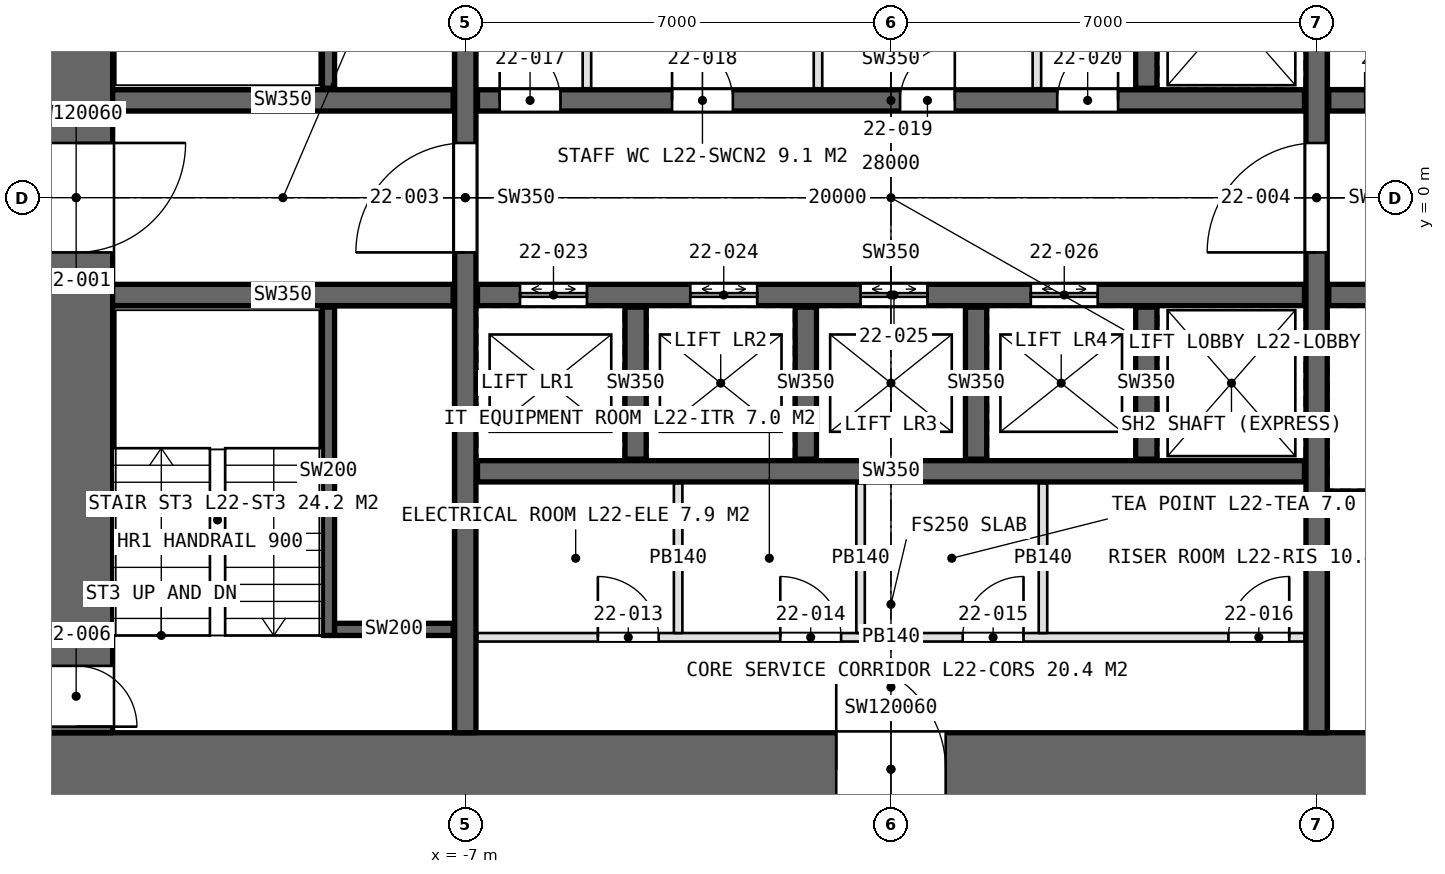
"""IFC4 building model, lengths in metres.
Left out: names, types, materials, properties, quantities, classifications, styles, units other than length and angle.
Written with IfcOpenShell. Run it as: python <this file> out.ifc"""

import sys

from ifc_helpers import new_model, si_unit, direction, frame, frame_2d, origin, place, context, subcontext, project, spatial, rectangle, extrude, element, fill, save


model = new_model("IFC4")
c1 = context("Model", 3, precision=1e-05, world=origin(), true_north=direction((0.0, 1.0)))
c2 = subcontext(c1, "Body", "Model", "MODEL_VIEW")
j1 = project(units=[si_unit("LENGTHUNIT", "METRE"), si_unit("PLANEANGLEUNIT", "RADIAN")], contexts=[c1])
p1 = place(None, origin())
s1 = spatial("IfcSite", under=j1, at=p1, CompositionType="ELEMENT")
p2 = place(p1, origin())
s2 = spatial("IfcBuilding", under=s1, at=p2, CompositionType="ELEMENT")
p3 = place(p2, frame((0.0, 0.0, 109.2)))
s3 = spatial("IfcBuildingStorey", under=s2, at=p3, CompositionType="ELEMENT", Elevation=109.2)
p4 = place(p3, frame((-14.0, -9.4, 0.0), z_axis=(0.0, 0.0, 1.0), x_axis=(1.0, 0.0, 0.0)))
e1 = element("IfcWall", 1, at=p4, inside=s3, PredefinedType="SHEAR", context=c2, shape_type="SweptSolid", body=[
    extrude(rectangle(XDim=28.0, YDim=1.2, at=frame_2d((14.0, 0.0))), origin(), (0.0, 0.0, 1.0), 4.2),
])
p5 = place(p4, frame((13.1, 0.0, 0.0)))
e2 = element("IfcOpeningElement", 2, at=p5, cuts=e1, PredefinedType="OPENING", context=c2, shape_type="SweptSolid", body=[
    extrude(rectangle(XDim=1.8, YDim=2.4, at=frame_2d((0.9, 1.2))), frame((0.0, 0.61, 0.0), z_axis=(0.0, -1.0, 0.0), x_axis=(1.0, 0.0, 0.0)), (0.0, 0.0, 1.0), 1.22),
])
p6 = place(p4, frame((22.9, 0.0, 0.0)))
e3 = element("IfcOpeningElement", 3, at=p6, cuts=e1, PredefinedType="OPENING", context=c2, shape_type="SweptSolid", body=[
    extrude(rectangle(XDim=2.2, YDim=2.7, at=frame_2d((1.1, 1.35))), frame((0.0, 0.61, 0.0), z_axis=(0.0, -1.0, 0.0), x_axis=(1.0, 0.0, 0.0)), (0.0, 0.0, 1.0), 1.22),
])
p7 = place(p3, frame((-13.4, 8.8, 0.0), z_axis=(0.0, 0.0, 1.0), x_axis=(0.0, -1.0, 0.0)))
e4 = element("IfcWall", 4, at=p7, inside=s3, PredefinedType="SHEAR", context=c2, shape_type="SweptSolid", body=[
    extrude(rectangle(XDim=17.6, YDim=1.2, at=frame_2d((8.8, 0.0))), origin(), (0.0, 0.0, 1.0), 4.2),
])
p8 = place(p7, frame((7.9, 0.0, 0.0)))
e5 = element("IfcOpeningElement", 5, at=p8, cuts=e4, PredefinedType="OPENING", context=c2, shape_type="SweptSolid", body=[
    extrude(rectangle(XDim=1.8, YDim=2.4, at=frame_2d((0.9, 1.2))), frame((0.0, 0.61, 0.0), z_axis=(0.0, -1.0, 0.0), x_axis=(1.0, 0.0, 0.0)), (0.0, 0.0, 1.0), 1.22),
])
p9 = place(p7, frame((16.5, 0.0, 0.0)))
e6 = element("IfcOpeningElement", 6, at=p9, cuts=e4, PredefinedType="OPENING", context=c2, shape_type="SweptSolid", body=[
    extrude(rectangle(XDim=1.0, YDim=2.4, at=frame_2d((0.5, 1.2))), frame((0.0, 0.61, 0.0), z_axis=(0.0, -1.0, 0.0), x_axis=(1.0, 0.0, 0.0)), (0.0, 0.0, 1.0), 1.22),
])
p10 = place(p3, frame((-7.0, -8.8, 0.0), z_axis=(0.0, 0.0, 1.0), x_axis=(0.0, 1.0, 0.0)))
e7 = element("IfcWall", 7, at=p10, inside=s3, PredefinedType="SHEAR", context=c2, shape_type="SweptSolid", body=[
    extrude(rectangle(XDim=17.6, YDim=0.35, at=frame_2d((8.8, 0.0))), origin(), (0.0, 0.0, 1.0), 4.2),
])
p11 = place(p10, frame((7.9, 0.0, 0.0)))
e8 = element("IfcOpeningElement", 8, at=p11, cuts=e7, PredefinedType="OPENING", context=c2, shape_type="SweptSolid", body=[
    extrude(rectangle(XDim=1.8, YDim=2.4, at=frame_2d((0.9, 1.2))), frame((0.0, 0.185, 0.0), z_axis=(0.0, -1.0, 0.0), x_axis=(1.0, 0.0, 0.0)), (0.0, 0.0, 1.0), 0.37),
])
p12 = place(p3, frame((7.0, -8.8, 0.0), z_axis=(0.0, 0.0, 1.0), x_axis=(0.0, 1.0, 0.0)))
e9 = element("IfcWall", 9, at=p12, inside=s3, PredefinedType="SHEAR", context=c2, shape_type="SweptSolid", body=[
    extrude(rectangle(XDim=17.6, YDim=0.35, at=frame_2d((8.8, 0.0))), origin(), (0.0, 0.0, 1.0), 4.2),
])
p13 = place(p12, frame((7.9, 0.0, 0.0)))
e10 = element("IfcOpeningElement", 10, at=p13, cuts=e9, PredefinedType="OPENING", context=c2, shape_type="SweptSolid", body=[
    extrude(rectangle(XDim=1.8, YDim=2.4, at=frame_2d((0.9, 1.2))), frame((0.0, 0.185, 0.0), z_axis=(0.0, -1.0, 0.0), x_axis=(1.0, 0.0, 0.0)), (0.0, 0.0, 1.0), 0.37),
])
p14 = place(p3, frame((-6.8, 1.6, 0.0), z_axis=(0.0, 0.0, 1.0), x_axis=(1.0, 0.0, 0.0)))
e11 = element("IfcWall", 11, at=p14, inside=s3, PredefinedType="SHEAR", context=c2, shape_type="SweptSolid", body=[
    extrude(rectangle(XDim=13.6, YDim=0.35, at=frame_2d((6.8, 0.0))), origin(), (0.0, 0.0, 1.0), 4.2),
])
p15 = place(p14, frame((0.365, 0.0, 0.0)))
e12 = element("IfcOpeningElement", 12, at=p15, cuts=e11, PredefinedType="OPENING", context=c2, shape_type="SweptSolid", body=[
    extrude(rectangle(XDim=1.0, YDim=2.4, at=frame_2d((0.5, 1.2))), frame((0.0, 0.185, 0.0), z_axis=(0.0, -1.0, 0.0), x_axis=(1.0, 0.0, 0.0)), (0.0, 0.0, 1.0), 0.37),
])
p16 = place(p14, frame((3.2, 0.0, 0.0)))
e13 = element("IfcOpeningElement", 13, at=p16, cuts=e11, PredefinedType="OPENING", context=c2, shape_type="SweptSolid", body=[
    extrude(rectangle(XDim=1.0, YDim=2.4, at=frame_2d((0.5, 1.2))), frame((0.0, 0.185, 0.0), z_axis=(0.0, -1.0, 0.0), x_axis=(1.0, 0.0, 0.0)), (0.0, 0.0, 1.0), 0.37),
])
p17 = place(p14, frame((6.95, 0.0, 0.0)))
e14 = element("IfcOpeningElement", 14, at=p17, cuts=e11, PredefinedType="OPENING", context=c2, shape_type="SweptSolid", body=[
    extrude(rectangle(XDim=0.9, YDim=2.4, at=frame_2d((0.45, 1.2))), frame((0.0, 0.185, 0.0), z_axis=(0.0, -1.0, 0.0), x_axis=(1.0, 0.0, 0.0)), (0.0, 0.0, 1.0), 0.37),
])
p18 = place(p14, frame((9.535, 0.0, 0.0)))
e15 = element("IfcOpeningElement", 15, at=p18, cuts=e11, PredefinedType="OPENING", context=c2, shape_type="SweptSolid", body=[
    extrude(rectangle(XDim=1.0, YDim=2.4, at=frame_2d((0.5, 1.2))), frame((0.0, 0.185, 0.0), z_axis=(0.0, -1.0, 0.0), x_axis=(1.0, 0.0, 0.0)), (0.0, 0.0, 1.0), 0.37),
])
p19 = place(p3, frame((-6.8, -1.6, 0.0), z_axis=(0.0, 0.0, 1.0), x_axis=(1.0, 0.0, 0.0)))
e16 = element("IfcWall", 16, at=p19, inside=s3, PredefinedType="SHEAR", context=c2, shape_type="SweptSolid", body=[
    extrude(rectangle(XDim=13.6, YDim=0.35, at=frame_2d((6.8, 0.0))), origin(), (0.0, 0.0, 1.0), 4.2),
])
p20 = place(p19, frame((0.7, 0.0, 0.0)))
e17 = element("IfcOpeningElement", 17, at=p20, cuts=e16, PredefinedType="OPENING", context=c2, shape_type="SweptSolid", body=[
    extrude(rectangle(XDim=1.1, YDim=2.4, at=frame_2d((0.55, 1.2))), frame((0.0, 0.185, 0.0), z_axis=(0.0, -1.0, 0.0), x_axis=(1.0, 0.0, 0.0)), (0.0, 0.0, 1.0), 0.37),
])
p21 = place(p19, frame((3.5, 0.0, 0.0)))
e18 = element("IfcOpeningElement", 18, at=p21, cuts=e16, PredefinedType="OPENING", context=c2, shape_type="SweptSolid", body=[
    extrude(rectangle(XDim=1.1, YDim=2.4, at=frame_2d((0.55, 1.2))), frame((0.0, 0.185, 0.0), z_axis=(0.0, -1.0, 0.0), x_axis=(1.0, 0.0, 0.0)), (0.0, 0.0, 1.0), 0.37),
])
p22 = place(p19, frame((6.3, 0.0, 0.0)))
e19 = element("IfcOpeningElement", 19, at=p22, cuts=e16, PredefinedType="OPENING", context=c2, shape_type="SweptSolid", body=[
    extrude(rectangle(XDim=1.1, YDim=2.4, at=frame_2d((0.55, 1.2))), frame((0.0, 0.185, 0.0), z_axis=(0.0, -1.0, 0.0), x_axis=(1.0, 0.0, 0.0)), (0.0, 0.0, 1.0), 0.37),
])
p23 = place(p19, frame((9.1, 0.0, 0.0)))
e20 = element("IfcOpeningElement", 20, at=p23, cuts=e16, PredefinedType="OPENING", context=c2, shape_type="SweptSolid", body=[
    extrude(rectangle(XDim=1.1, YDim=2.4, at=frame_2d((0.55, 1.2))), frame((0.0, 0.185, 0.0), z_axis=(0.0, -1.0, 0.0), x_axis=(1.0, 0.0, 0.0)), (0.0, 0.0, 1.0), 0.37),
])
p24 = place(p3, frame((-6.8, -4.5, 0.0), z_axis=(0.0, 0.0, 1.0), x_axis=(1.0, 0.0, 0.0)))
e21 = element("IfcWall", 21, at=p24, inside=s3, PredefinedType="SHEAR", context=c2, shape_type="SweptSolid", body=[
    extrude(rectangle(XDim=13.6, YDim=0.35, at=frame_2d((6.8, 0.0))), origin(), (0.0, 0.0, 1.0), 4.2),
])
for number, where, z_axis, x_axis in (
    (22, (-12.8, 1.6, 0.0), (0.0, 0.0, 1.0), (1.0, 0.0, 0.0)),
    (23, (-12.8, -1.6, 0.0), (0.0, 0.0, 1.0), (1.0, 0.0, 0.0)),
):
    element("IfcWall", number, at=place(p3, frame(where, z_axis=z_axis, x_axis=x_axis)), inside=s3, PredefinedType="SHEAR", context=c2, shape_type="SweptSolid", body=[
        extrude(rectangle(XDim=5.6, YDim=0.35, at=frame_2d((2.8, 0.0))), origin(), (0.0, 0.0, 1.0), 4.2),
    ])
p25 = place(p3, frame((7.2, 1.6, 0.0), z_axis=(0.0, 0.0, 1.0), x_axis=(1.0, 0.0, 0.0)))
e24 = element("IfcWall", 24, at=p25, inside=s3, PredefinedType="SHEAR", context=c2, shape_type="SweptSolid", body=[
    extrude(rectangle(XDim=5.6, YDim=0.35, at=frame_2d((2.8, 0.0))), origin(), (0.0, 0.0, 1.0), 4.2),
])
p26 = place(p25, frame((0.6, 0.0, 0.0)))
e25 = element("IfcOpeningElement", 25, at=p26, cuts=e24, PredefinedType="OPENING", context=c2, shape_type="SweptSolid", body=[
    extrude(rectangle(XDim=1.0, YDim=2.4, at=frame_2d((0.5, 1.2))), frame((0.0, 0.185, 0.0), z_axis=(0.0, -1.0, 0.0), x_axis=(1.0, 0.0, 0.0)), (0.0, 0.0, 1.0), 0.37),
])
p27 = place(p3, frame((7.2, -1.6, 0.0), z_axis=(0.0, 0.0, 1.0), x_axis=(1.0, 0.0, 0.0)))
e26 = element("IfcWall", 26, at=p27, inside=s3, PredefinedType="SHEAR", context=c2, shape_type="SweptSolid", body=[
    extrude(rectangle(XDim=5.6, YDim=0.35, at=frame_2d((2.8, 0.0))), origin(), (0.0, 0.0, 1.0), 4.2),
])
p28 = place(p27, frame((0.9, 0.0, 0.0)))
e27 = element("IfcOpeningElement", 27, at=p28, cuts=e26, PredefinedType="OPENING", context=c2, shape_type="SweptSolid", body=[
    extrude(rectangle(XDim=1.3, YDim=2.4, at=frame_2d((0.65, 1.2))), frame((0.0, 0.185, 0.0), z_axis=(0.0, -1.0, 0.0), x_axis=(1.0, 0.0, 0.0)), (0.0, 0.0, 1.0), 0.37),
])
p29 = place(p27, frame((3.9, 0.0, 0.0)))
e28 = element("IfcOpeningElement", 28, at=p29, cuts=e26, PredefinedType="OPENING", context=c2, shape_type="SweptSolid", body=[
    extrude(rectangle(XDim=1.3, YDim=2.4, at=frame_2d((0.65, 1.2))), frame((0.0, 0.185, 0.0), z_axis=(0.0, -1.0, 0.0), x_axis=(1.0, 0.0, 0.0)), (0.0, 0.0, 1.0), 0.37),
])
p30 = place(p3, frame((7.2, -5.0, 0.0), z_axis=(0.0, 0.0, 1.0), x_axis=(1.0, 0.0, 0.0)))
e29 = element("IfcWall", 29, at=p30, inside=s3, PredefinedType="SHEAR", context=c2, shape_type="SweptSolid", body=[
    extrude(rectangle(XDim=5.6, YDim=0.35, at=frame_2d((2.8, 0.0))), origin(), (0.0, 0.0, 1.0), 4.2),
])
for number, where, z_axis, x_axis in (
    (30, (-4.2, -4.3, 0.0), (0.0, 0.0, 1.0), (0.0, 1.0, 0.0)),
    (31, (-1.4, -4.3, 0.0), (0.0, 0.0, 1.0), (0.0, 1.0, 0.0)),
    (32, (1.4, -4.3, 0.0), (0.0, 0.0, 1.0), (0.0, 1.0, 0.0)),
    (33, (4.2, 1.8, 0.0), (0.0, 0.0, 1.0), (0.0, 1.0, 0.0)),
    (34, (4.2, -4.3, 0.0), (0.0, 0.0, 1.0), (0.0, 1.0, 0.0)),
):
    element("IfcWall", number, at=place(p3, frame(where, z_axis=z_axis, x_axis=x_axis)), inside=s3, PredefinedType="SHEAR", context=c2, shape_type="SweptSolid", body=[
        extrude(rectangle(XDim=2.5, YDim=0.35, at=frame_2d((1.25, 0.0))), origin(), (0.0, 0.0, 1.0), 4.2),
    ])
p31 = place(p3, frame((-6.8, -7.23, 0.0), z_axis=(0.0, 0.0, 1.0), x_axis=(1.0, 0.0, 0.0)))
e35 = element("IfcWall", 35, at=p31, inside=s3, PredefinedType="PARTITIONING", context=c2, shape_type="SweptSolid", body=[
    extrude(rectangle(XDim=13.6, YDim=0.14, at=frame_2d((6.8, 0.0))), origin(), (0.0, 0.0, 1.0), 3.95),
])
p32 = place(p31, frame((1.98, 0.0, 0.0)))
e36 = element("IfcOpeningElement", 36, at=p32, cuts=e35, PredefinedType="OPENING", context=c2, shape_type="SweptSolid", body=[
    extrude(rectangle(XDim=1.0, YDim=2.4, at=frame_2d((0.5, 1.2))), frame((0.0, 0.08, 0.0), z_axis=(0.0, -1.0, 0.0), x_axis=(1.0, 0.0, 0.0)), (0.0, 0.0, 1.0), 0.16),
])
p33 = place(p31, frame((4.98, 0.0, 0.0)))
e37 = element("IfcOpeningElement", 37, at=p33, cuts=e35, PredefinedType="OPENING", context=c2, shape_type="SweptSolid", body=[
    extrude(rectangle(XDim=1.0, YDim=2.4, at=frame_2d((0.5, 1.2))), frame((0.0, 0.08, 0.0), z_axis=(0.0, -1.0, 0.0), x_axis=(1.0, 0.0, 0.0)), (0.0, 0.0, 1.0), 0.16),
])
p34 = place(p31, frame((7.98, 0.0, 0.0)))
e38 = element("IfcOpeningElement", 38, at=p34, cuts=e35, PredefinedType="OPENING", context=c2, shape_type="SweptSolid", body=[
    extrude(rectangle(XDim=1.0, YDim=2.4, at=frame_2d((0.5, 1.2))), frame((0.0, 0.08, 0.0), z_axis=(0.0, -1.0, 0.0), x_axis=(1.0, 0.0, 0.0)), (0.0, 0.0, 1.0), 0.16),
])
p35 = place(p31, frame((12.35, 0.0, 0.0)))
e39 = element("IfcOpeningElement", 39, at=p35, cuts=e35, PredefinedType="OPENING", context=c2, shape_type="SweptSolid", body=[
    extrude(rectangle(XDim=1.0, YDim=2.4, at=frame_2d((0.5, 1.2))), frame((0.0, 0.08, 0.0), z_axis=(0.0, -1.0, 0.0), x_axis=(1.0, 0.0, 0.0)), (0.0, 0.0, 1.0), 0.16),
])
for number, where, z_axis, x_axis in (
    (40, (-3.5, -4.7, 0.0), (0.0, 0.0, 1.0), (0.0, -1.0, 0.0)),
    (41, (-0.5, -4.7, 0.0), (0.0, 0.0, 1.0), (0.0, -1.0, 0.0)),
    (42, (2.5, -4.7, 0.0), (0.0, 0.0, 1.0), (0.0, -1.0, 0.0)),
):
    element("IfcWall", number, at=place(p3, frame(where, z_axis=z_axis, x_axis=x_axis)), inside=s3, PredefinedType="PARTITIONING", context=c2, shape_type="SweptSolid", body=[
        extrude(rectangle(XDim=2.46, YDim=0.14, at=frame_2d((1.23, 0.0))), origin(), (0.0, 0.0, 1.0), 3.95),
    ])
for number, where, z_axis, x_axis in (
    (43, (-5.0, 1.8, 0.0), (0.0, 0.0, 1.0), (0.0, 1.0, 0.0)),
    (44, (-1.2, 1.8, 0.0), (0.0, 0.0, 1.0), (0.0, 1.0, 0.0)),
    (45, (2.4, 1.8, 0.0), (0.0, 0.0, 1.0), (0.0, 1.0, 0.0)),
):
    element("IfcWall", number, at=place(p3, frame(where, z_axis=z_axis, x_axis=x_axis)), inside=s3, PredefinedType="PARTITIONING", context=c2, shape_type="SweptSolid", body=[
        extrude(rectangle(XDim=2.5, YDim=0.14, at=frame_2d((1.25, 0.0))), origin(), (0.0, 0.0, 1.0), 3.95),
    ])
for number, where, z_axis, x_axis in (
    (46, (-9.25, 7.2, 0.0), (0.0, 0.0, 1.0), (0.0, -1.0, 0.0)),
    (47, (-9.25, -7.2, 0.0), (0.0, 0.0, 1.0), (0.0, 1.0, 0.0)),
):
    element("IfcWall", number, at=place(p3, frame(where, z_axis=z_axis, x_axis=x_axis)), inside=s3, PredefinedType="SOLIDWALL", context=c2, shape_type="SweptSolid", body=[
        extrude(rectangle(XDim=5.4, YDim=0.2, at=frame_2d((2.7, 0.0))), origin(), (0.0, 0.0, 1.0), 4.2),
    ])
p36 = place(p3, frame((-9.15, -7.1, 0.0), z_axis=(0.0, 0.0, 1.0), x_axis=(1.0, 0.0, 0.0)))
e48 = element("IfcWall", 48, at=p36, inside=s3, PredefinedType="SOLIDWALL", context=c2, shape_type="SweptSolid", body=[
    extrude(rectangle(XDim=1.95, YDim=0.2, at=frame_2d((0.975, 0.0))), origin(), (0.0, 0.0, 1.0), 4.2),
])
p37 = place(p8, origin())
e49 = element("IfcDoor", 49, at=p37, inside=s3, OperationType="DOUBLE_DOOR_SINGLE_SWING", PredefinedType="DOOR", context=c2, shape_type="SweptSolid", body=[
    extrude(rectangle(XDim=1.8, YDim=2.4, at=frame_2d((0.9, 1.2))), frame((0.0, 0.025, 0.0), z_axis=(0.0, -1.0, 0.0), x_axis=(1.0, 0.0, 0.0)), (0.0, 0.0, 1.0), 0.05),
])
fill(e5, e49)
p38 = place(p11, origin())
e50 = element("IfcDoor", 50, at=p38, inside=s3, OperationType="DOUBLE_DOOR_SINGLE_SWING", PredefinedType="DOOR", context=c2, shape_type="SweptSolid", body=[
    extrude(rectangle(XDim=1.8, YDim=2.4, at=frame_2d((0.9, 1.2))), frame((0.0, 0.025, 0.0), z_axis=(0.0, -1.0, 0.0), x_axis=(1.0, 0.0, 0.0)), (0.0, 0.0, 1.0), 0.05),
])
fill(e8, e50)
p39 = place(p13, origin())
e51 = element("IfcDoor", 51, at=p39, inside=s3, OperationType="DOUBLE_DOOR_SINGLE_SWING", PredefinedType="DOOR", context=c2, shape_type="SweptSolid", body=[
    extrude(rectangle(XDim=1.8, YDim=2.4, at=frame_2d((0.9, 1.2))), frame((0.0, 0.025, 0.0), z_axis=(0.0, -1.0, 0.0), x_axis=(1.0, 0.0, 0.0)), (0.0, 0.0, 1.0), 0.05),
])
fill(e10, e51)
p40 = place(p9, origin())
e52 = element("IfcDoor", 52, at=p40, inside=s3, OperationType="SINGLE_SWING_RIGHT", PredefinedType="DOOR", context=c2, shape_type="SweptSolid", body=[
    extrude(rectangle(XDim=1.0, YDim=2.4, at=frame_2d((0.5, 1.2))), frame((0.0, 0.025, 0.0), z_axis=(0.0, -1.0, 0.0), x_axis=(1.0, 0.0, 0.0)), (0.0, 0.0, 1.0), 0.05),
])
fill(e6, e52)
p41 = place(p32, origin())
e53 = element("IfcDoor", 53, at=p41, inside=s3, OperationType="SINGLE_SWING_LEFT", PredefinedType="DOOR", context=c2, shape_type="SweptSolid", body=[
    extrude(rectangle(XDim=1.0, YDim=2.4, at=frame_2d((0.5, 1.2))), frame((0.0, 0.025, 0.0), z_axis=(0.0, -1.0, 0.0), x_axis=(1.0, 0.0, 0.0)), (0.0, 0.0, 1.0), 0.05),
])
fill(e36, e53)
p42 = place(p33, origin())
e54 = element("IfcDoor", 54, at=p42, inside=s3, OperationType="SINGLE_SWING_LEFT", PredefinedType="DOOR", context=c2, shape_type="SweptSolid", body=[
    extrude(rectangle(XDim=1.0, YDim=2.4, at=frame_2d((0.5, 1.2))), frame((0.0, 0.025, 0.0), z_axis=(0.0, -1.0, 0.0), x_axis=(1.0, 0.0, 0.0)), (0.0, 0.0, 1.0), 0.05),
])
fill(e37, e54)
p43 = place(p34, origin())
e55 = element("IfcDoor", 55, at=p43, inside=s3, OperationType="SINGLE_SWING_RIGHT", PredefinedType="DOOR", context=c2, shape_type="SweptSolid", body=[
    extrude(rectangle(XDim=1.0, YDim=2.4, at=frame_2d((0.5, 1.2))), frame((0.0, 0.025, 0.0), z_axis=(0.0, -1.0, 0.0), x_axis=(1.0, 0.0, 0.0)), (0.0, 0.0, 1.0), 0.05),
])
fill(e38, e55)
p44 = place(p35, origin())
e56 = element("IfcDoor", 56, at=p44, inside=s3, OperationType="SINGLE_SWING_RIGHT", PredefinedType="DOOR", context=c2, shape_type="SweptSolid", body=[
    extrude(rectangle(XDim=1.0, YDim=2.4, at=frame_2d((0.5, 1.2))), frame((0.0, 0.025, 0.0), z_axis=(0.0, -1.0, 0.0), x_axis=(1.0, 0.0, 0.0)), (0.0, 0.0, 1.0), 0.05),
])
fill(e39, e56)
p45 = place(p15, origin())
e57 = element("IfcDoor", 57, at=p45, inside=s3, OperationType="SINGLE_SWING_LEFT", PredefinedType="DOOR", context=c2, shape_type="SweptSolid", body=[
    extrude(rectangle(XDim=1.0, YDim=2.4, at=frame_2d((0.5, 1.2))), frame((0.0, 0.025, 0.0), z_axis=(0.0, -1.0, 0.0), x_axis=(1.0, 0.0, 0.0)), (0.0, 0.0, 1.0), 0.05),
])
fill(e12, e57)
p46 = place(p16, origin())
e58 = element("IfcDoor", 58, at=p46, inside=s3, OperationType="SINGLE_SWING_LEFT", PredefinedType="DOOR", context=c2, shape_type="SweptSolid", body=[
    extrude(rectangle(XDim=1.0, YDim=2.4, at=frame_2d((0.5, 1.2))), frame((0.0, 0.025, 0.0), z_axis=(0.0, -1.0, 0.0), x_axis=(1.0, 0.0, 0.0)), (0.0, 0.0, 1.0), 0.05),
])
fill(e13, e58)
p47 = place(p17, origin())
e59 = element("IfcDoor", 59, at=p47, inside=s3, OperationType="SINGLE_SWING_RIGHT", PredefinedType="DOOR", context=c2, shape_type="SweptSolid", body=[
    extrude(rectangle(XDim=0.9, YDim=2.4, at=frame_2d((0.45, 1.2))), frame((0.0, 0.025, 0.0), z_axis=(0.0, -1.0, 0.0), x_axis=(1.0, 0.0, 0.0)), (0.0, 0.0, 1.0), 0.05),
])
fill(e14, e59)
p48 = place(p18, origin())
e60 = element("IfcDoor", 60, at=p48, inside=s3, OperationType="SINGLE_SWING_RIGHT", PredefinedType="DOOR", context=c2, shape_type="SweptSolid", body=[
    extrude(rectangle(XDim=1.0, YDim=2.4, at=frame_2d((0.5, 1.2))), frame((0.0, 0.025, 0.0), z_axis=(0.0, -1.0, 0.0), x_axis=(1.0, 0.0, 0.0)), (0.0, 0.0, 1.0), 0.05),
])
fill(e15, e60)
p49 = place(p5, origin())
e61 = element("IfcDoor", 61, at=p49, inside=s3, OperationType="DOUBLE_DOOR_SINGLE_SWING", PredefinedType="DOOR", context=c2, shape_type="SweptSolid", body=[
    extrude(rectangle(XDim=1.8, YDim=2.4, at=frame_2d((0.9, 1.2))), frame((0.0, 0.025, 0.0), z_axis=(0.0, -1.0, 0.0), x_axis=(1.0, 0.0, 0.0)), (0.0, 0.0, 1.0), 0.05),
])
fill(e2, e61)
p50 = place(p20, origin())
e62 = element("IfcDoor", 62, at=p50, inside=s3, OperationType="DOUBLE_DOOR_SLIDING", PredefinedType="DOOR", context=c2, shape_type="SweptSolid", body=[
    extrude(rectangle(XDim=1.1, YDim=2.4, at=frame_2d((0.55, 1.2))), frame((0.0, 0.025, 0.0), z_axis=(0.0, -1.0, 0.0), x_axis=(1.0, 0.0, 0.0)), (0.0, 0.0, 1.0), 0.05),
])
fill(e17, e62)
p51 = place(p21, origin())
e63 = element("IfcDoor", 63, at=p51, inside=s3, OperationType="DOUBLE_DOOR_SLIDING", PredefinedType="DOOR", context=c2, shape_type="SweptSolid", body=[
    extrude(rectangle(XDim=1.1, YDim=2.4, at=frame_2d((0.55, 1.2))), frame((0.0, 0.025, 0.0), z_axis=(0.0, -1.0, 0.0), x_axis=(1.0, 0.0, 0.0)), (0.0, 0.0, 1.0), 0.05),
])
fill(e18, e63)
p52 = place(p22, origin())
e64 = element("IfcDoor", 64, at=p52, inside=s3, OperationType="DOUBLE_DOOR_SLIDING", PredefinedType="DOOR", context=c2, shape_type="SweptSolid", body=[
    extrude(rectangle(XDim=1.1, YDim=2.4, at=frame_2d((0.55, 1.2))), frame((0.0, 0.025, 0.0), z_axis=(0.0, -1.0, 0.0), x_axis=(1.0, 0.0, 0.0)), (0.0, 0.0, 1.0), 0.05),
])
fill(e19, e64)
p53 = place(p23, origin())
e65 = element("IfcDoor", 65, at=p53, inside=s3, OperationType="DOUBLE_DOOR_SLIDING", PredefinedType="DOOR", context=c2, shape_type="SweptSolid", body=[
    extrude(rectangle(XDim=1.1, YDim=2.4, at=frame_2d((0.55, 1.2))), frame((0.0, 0.025, 0.0), z_axis=(0.0, -1.0, 0.0), x_axis=(1.0, 0.0, 0.0)), (0.0, 0.0, 1.0), 0.05),
])
fill(e20, e65)
save(model, sys.argv[1])
